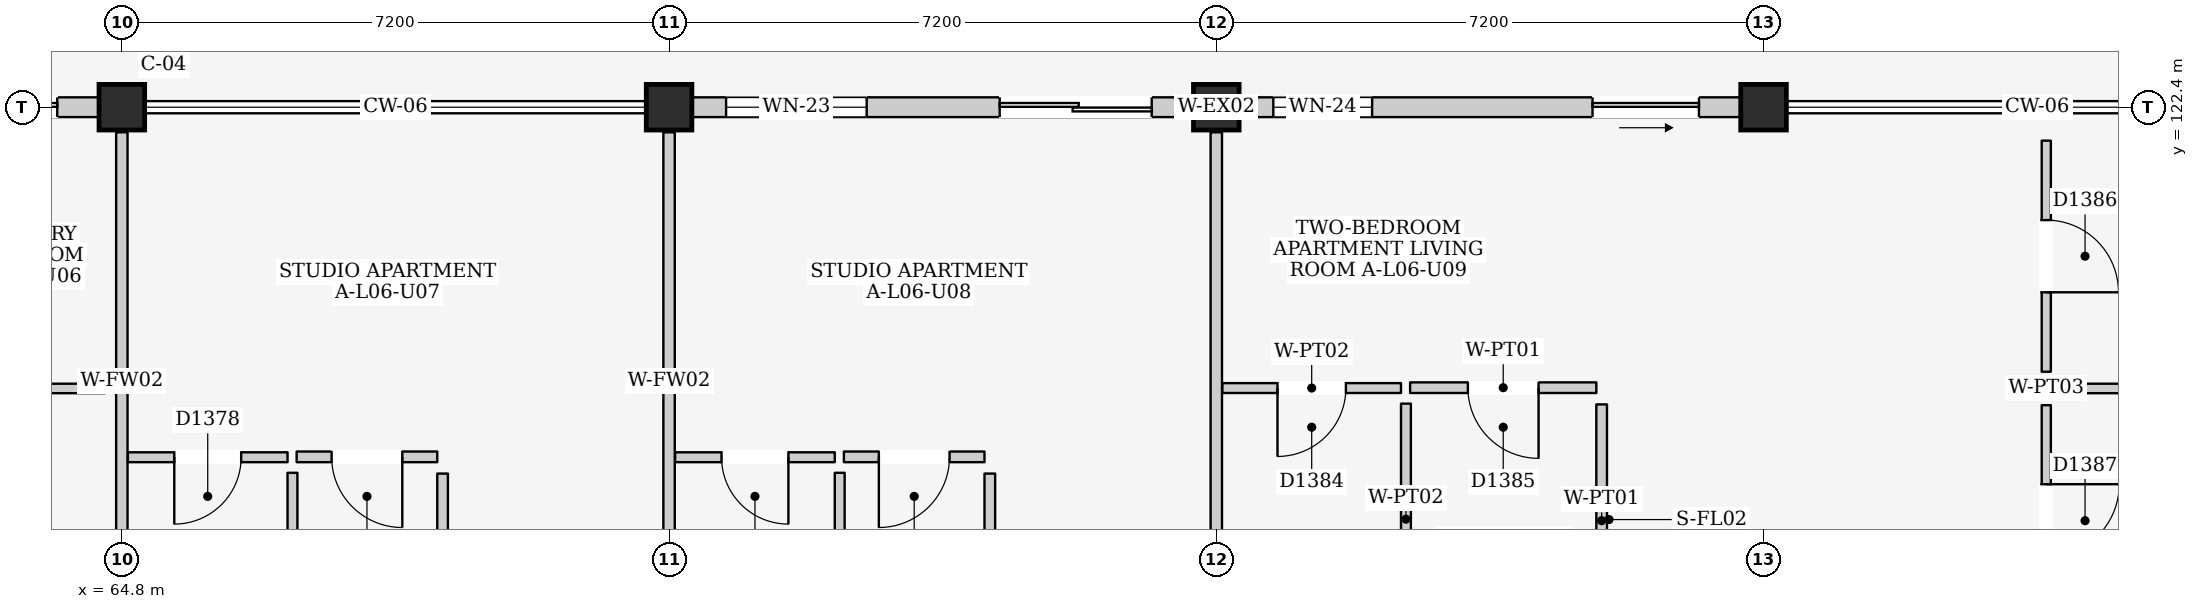
"""IFC4 building model, lengths in metres.
Left out: names, types, materials, properties, quantities, classifications, styles, units other than length and angle.
Written with IfcOpenShell. Run it as: python <this file> out.ifc"""

import sys

from ifc_helpers import new_model, si_unit, direction, frame, frame_2d, origin, origin_2d, place, context, subcontext, project, spatial, rectangle, extrude, element, fill, save


model = new_model("IFC4")
c1 = context("Model", 3, precision=1e-05, world=origin(), true_north=direction((0.0, 1.0)))
c2 = subcontext(c1, "Body", "Model", "MODEL_VIEW")
j1 = project(units=[si_unit("LENGTHUNIT", "METRE"), si_unit("PLANEANGLEUNIT", "RADIAN")], contexts=[c1])
p1 = place(None, origin())
s1 = spatial("IfcSite", under=j1, at=p1, CompositionType="ELEMENT")
p2 = place(p1, origin())
s2 = spatial("IfcBuilding", under=s1, at=p2, CompositionType="ELEMENT")
p3 = place(p2, frame((0.0, 0.0, 21.9)))
s3 = spatial("IfcBuildingStorey", under=s2, at=p3, CompositionType="ELEMENT", Elevation=21.9)
for number, where, z_axis, x_axis in (
    (1, (64.8, 122.4, 0.0), (0.0, 0.0, 1.0), (1.0, 0.0, 0.0)),
    (2, (72.0, 122.4, 0.0), (0.0, 0.0, 1.0), (1.0, 0.0, 0.0)),
    (3, (79.2, 122.4, 0.0), (0.0, 0.0, 1.0), (1.0, 0.0, 0.0)),
    (4, (86.4, 122.4, 0.0), (0.0, 0.0, 1.0), (1.0, 0.0, 0.0)),
):
    element("IfcColumn", number, at=place(p3, frame(where, z_axis=z_axis, x_axis=x_axis)), inside=s3, PredefinedType="COLUMN", context=c2, shape_type="SweptSolid", body=[
        extrude(rectangle(XDim=0.6, YDim=0.6, at=origin_2d()), origin(), (0.0, 0.0, 1.0), 3.2),
    ])
p4 = place(p3, frame((57.9, 122.4, 0.0), z_axis=(0.0, 0.0, 1.0), x_axis=(1.0, 0.0, 0.0)))
e5 = element("IfcWall", 5, at=p4, inside=s3, PredefinedType="ELEMENTEDWALL", context=c2, shape_type="SweptSolid", body=[
    extrude(rectangle(XDim=6.6, YDim=0.26, at=frame_2d((3.3, 0.0))), origin(), (0.0, 0.0, 1.0), 2.515),
])
p5 = place(p4, frame((4.55, 0.0, 0.0)))
e6 = element("IfcOpeningElement", 6, at=p5, cuts=e5, PredefinedType="OPENING", context=c2, shape_type="SweptSolid", body=[
    extrude(rectangle(XDim=1.5, YDim=2.12, at=frame_2d((0.75, 1.06))), frame((0.0, 0.145, 0.0), z_axis=(0.0, -1.0, 0.0), x_axis=(1.0, 0.0, 0.0)), (0.0, 0.0, 1.0), 0.29),
])
p6 = place(p4, frame((0.45, 0.0, 0.805)))
e7 = element("IfcOpeningElement", 7, at=p6, cuts=e5, PredefinedType="OPENING", context=c2, shape_type="SweptSolid", body=[
    extrude(rectangle(XDim=2.3, YDim=1.6, at=frame_2d((1.15, 0.8))), frame((0.0, 0.145, 0.0), z_axis=(0.0, -1.0, 0.0), x_axis=(1.0, 0.0, 0.0)), (0.0, 0.0, 1.0), 0.29),
])
p7 = place(p3, frame((72.3, 122.4, 0.0), z_axis=(0.0, 0.0, 1.0), x_axis=(1.0, 0.0, 0.0)))
e8 = element("IfcWall", 8, at=p7, inside=s3, PredefinedType="ELEMENTEDWALL", context=c2, shape_type="SweptSolid", body=[
    extrude(rectangle(XDim=6.6, YDim=0.26, at=frame_2d((3.3, 0.0))), origin(), (0.0, 0.0, 1.0), 2.515),
])
p8 = place(p7, frame((4.05, 0.0, 0.0)))
e9 = element("IfcOpeningElement", 9, at=p8, cuts=e8, PredefinedType="OPENING", context=c2, shape_type="SweptSolid", body=[
    extrude(rectangle(XDim=2.0, YDim=2.12, at=frame_2d((1.0, 1.06))), frame((0.0, 0.145, 0.0), z_axis=(0.0, -1.0, 0.0), x_axis=(1.0, 0.0, 0.0)), (0.0, 0.0, 1.0), 0.29),
])
p9 = place(p7, frame((0.45, 0.0, 0.9)))
e10 = element("IfcOpeningElement", 10, at=p9, cuts=e8, PredefinedType="OPENING", context=c2, shape_type="SweptSolid", body=[
    extrude(rectangle(XDim=1.85, YDim=1.4, at=frame_2d((0.925, 0.7))), frame((0.0, 0.145, 0.0), z_axis=(0.0, -1.0, 0.0), x_axis=(1.0, 0.0, 0.0)), (0.0, 0.0, 1.0), 0.29),
])
p10 = place(p3, frame((79.5, 122.4, 0.0), z_axis=(0.0, 0.0, 1.0), x_axis=(1.0, 0.0, 0.0)))
e11 = element("IfcWall", 11, at=p10, inside=s3, PredefinedType="ELEMENTEDWALL", context=c2, shape_type="SweptSolid", body=[
    extrude(rectangle(XDim=6.6, YDim=0.26, at=frame_2d((3.3, 0.0))), origin(), (0.0, 0.0, 1.0), 2.515),
])
p11 = place(p10, frame((4.65, 0.0, 0.0)))
e12 = element("IfcOpeningElement", 12, at=p11, cuts=e11, PredefinedType="OPENING", context=c2, shape_type="SweptSolid", body=[
    extrude(rectangle(XDim=1.4, YDim=2.1, at=frame_2d((0.7, 1.05))), frame((0.0, 0.145, 0.0), z_axis=(0.0, -1.0, 0.0), x_axis=(1.0, 0.0, 0.0)), (0.0, 0.0, 1.0), 0.29),
])
p12 = place(p10, frame((0.45, 0.0, 0.9)))
e13 = element("IfcOpeningElement", 13, at=p12, cuts=e11, PredefinedType="OPENING", context=c2, shape_type="SweptSolid", body=[
    extrude(rectangle(XDim=1.3, YDim=1.25, at=frame_2d((0.65, 0.625))), frame((0.0, 0.145, 0.0), z_axis=(0.0, -1.0, 0.0), x_axis=(1.0, 0.0, 0.0)), (0.0, 0.0, 1.0), 0.29),
])
p13 = place(p3, frame((64.8, 115.53, 0.0), z_axis=(0.0, 0.0, 1.0), x_axis=(0.0, 1.0, 0.0)))
e14 = element("IfcWall", 14, at=p13, inside=s3, PredefinedType="PARTITIONING", context=c2, shape_type="SweptSolid", body=[
    extrude(rectangle(XDim=6.54, YDim=0.15, at=frame_2d((3.27, 0.0))), origin(), (0.0, 0.0, 1.0), 2.465),
])
p14 = place(p3, frame((61.52, 118.7, 0.0), z_axis=(0.0, 0.0, 1.0), x_axis=(1.0, 0.0, 0.0)))
e15 = element("IfcWall", 15, at=p14, inside=s3, PredefinedType="PARTITIONING", context=c2, shape_type="SweptSolid", body=[
    extrude(rectangle(XDim=3.06, YDim=0.125, at=frame_2d((1.53, 0.0))), origin(), (0.0, 0.0, 1.0), 2.98),
])
p15 = place(p3, frame((72.0, 115.53, 0.0), z_axis=(0.0, 0.0, 1.0), x_axis=(0.0, 1.0, 0.0)))
e16 = element("IfcWall", 16, at=p15, inside=s3, PredefinedType="PARTITIONING", context=c2, shape_type="SweptSolid", body=[
    extrude(rectangle(XDim=6.54, YDim=0.15, at=frame_2d((3.27, 0.0))), origin(), (0.0, 0.0, 1.0), 2.465),
])
p16 = place(p3, frame((64.88, 117.795, 0.0), z_axis=(0.0, 0.0, 1.0), x_axis=(1.0, 0.0, 0.0)))
e17 = element("IfcWall", 17, at=p16, inside=s3, PredefinedType="PARTITIONING", context=c2, shape_type="SweptSolid", body=[
    extrude(rectangle(XDim=2.1, YDim=0.13, at=frame_2d((1.05, 0.0))), origin(), (0.0, 0.0, 1.0), 2.98),
])
p17 = place(p16, frame((0.61, 0.0, 0.0)))
e18 = element("IfcOpeningElement", 18, at=p17, cuts=e17, PredefinedType="OPENING", context=c2, shape_type="SweptSolid", body=[
    extrude(rectangle(XDim=0.88, YDim=2.1, at=frame_2d((0.44, 1.05))), frame((0.0, 0.08, 0.0), z_axis=(0.0, -1.0, 0.0), x_axis=(1.0, 0.0, 0.0)), (0.0, 0.0, 1.0), 0.16),
])
p18 = place(p3, frame((67.045, 115.46, 0.0), z_axis=(0.0, 0.0, 1.0), x_axis=(0.0, 1.0, 0.0)))
e19 = element("IfcWall", 19, at=p18, inside=s3, PredefinedType="PARTITIONING", context=c2, shape_type="SweptSolid", body=[
    extrude(rectangle(XDim=2.13, YDim=0.13, at=frame_2d((1.065, 0.0))), origin(), (0.0, 0.0, 1.0), 2.98),
])
p19 = place(p3, frame((67.1, 117.8, 0.0), z_axis=(0.0, 0.0, 1.0), x_axis=(1.0, 0.0, 0.0)))
e20 = element("IfcWall", 20, at=p19, inside=s3, PredefinedType="PARTITIONING", context=c2, shape_type="SweptSolid", body=[
    extrude(rectangle(XDim=1.85, YDim=0.14, at=frame_2d((0.925, 0.0))), origin(), (0.0, 0.0, 1.0), 2.98),
])
p20 = place(p19, frame((0.46, 0.0, 0.0)))
e21 = element("IfcOpeningElement", 21, at=p20, cuts=e20, PredefinedType="OPENING", context=c2, shape_type="SweptSolid", body=[
    extrude(rectangle(XDim=0.93, YDim=2.14, at=frame_2d((0.465, 1.07))), frame((0.0, 0.085, 0.0), z_axis=(0.0, -1.0, 0.0), x_axis=(1.0, 0.0, 0.0)), (0.0, 0.0, 1.0), 0.17),
])
p21 = place(p3, frame((69.02, 115.43, 0.0), z_axis=(0.0, 0.0, 1.0), x_axis=(0.0, 1.0, 0.0)))
e22 = element("IfcWall", 22, at=p21, inside=s3, PredefinedType="PARTITIONING", context=c2, shape_type="SweptSolid", body=[
    extrude(rectangle(XDim=2.15, YDim=0.14, at=frame_2d((1.075, 0.0))), origin(), (0.0, 0.0, 1.0), 2.98),
])
p22 = place(p3, frame((79.2, 115.53, 0.0), z_axis=(0.0, 0.0, 1.0), x_axis=(0.0, 1.0, 0.0)))
e23 = element("IfcWall", 23, at=p22, inside=s3, PredefinedType="PARTITIONING", context=c2, shape_type="SweptSolid", body=[
    extrude(rectangle(XDim=6.54, YDim=0.15, at=frame_2d((3.27, 0.0))), origin(), (0.0, 0.0, 1.0), 2.465),
])
p23 = place(p3, frame((72.08, 117.795, 0.0), z_axis=(0.0, 0.0, 1.0), x_axis=(1.0, 0.0, 0.0)))
e24 = element("IfcWall", 24, at=p23, inside=s3, PredefinedType="PARTITIONING", context=c2, shape_type="SweptSolid", body=[
    extrude(rectangle(XDim=2.1, YDim=0.13, at=frame_2d((1.05, 0.0))), origin(), (0.0, 0.0, 1.0), 2.98),
])
p24 = place(p23, frame((0.61, 0.0, 0.0)))
e25 = element("IfcOpeningElement", 25, at=p24, cuts=e24, PredefinedType="OPENING", context=c2, shape_type="SweptSolid", body=[
    extrude(rectangle(XDim=0.88, YDim=2.1, at=frame_2d((0.44, 1.05))), frame((0.0, 0.08, 0.0), z_axis=(0.0, -1.0, 0.0), x_axis=(1.0, 0.0, 0.0)), (0.0, 0.0, 1.0), 0.16),
])
p25 = place(p3, frame((74.245, 115.46, 0.0), z_axis=(0.0, 0.0, 1.0), x_axis=(0.0, 1.0, 0.0)))
e26 = element("IfcWall", 26, at=p25, inside=s3, PredefinedType="PARTITIONING", context=c2, shape_type="SweptSolid", body=[
    extrude(rectangle(XDim=2.13, YDim=0.13, at=frame_2d((1.065, 0.0))), origin(), (0.0, 0.0, 1.0), 2.98),
])
p26 = place(p3, frame((74.3, 117.8, 0.0), z_axis=(0.0, 0.0, 1.0), x_axis=(1.0, 0.0, 0.0)))
e27 = element("IfcWall", 27, at=p26, inside=s3, PredefinedType="PARTITIONING", context=c2, shape_type="SweptSolid", body=[
    extrude(rectangle(XDim=1.85, YDim=0.14, at=frame_2d((0.925, 0.0))), origin(), (0.0, 0.0, 1.0), 2.98),
])
p27 = place(p26, frame((0.46, 0.0, 0.0)))
e28 = element("IfcOpeningElement", 28, at=p27, cuts=e27, PredefinedType="OPENING", context=c2, shape_type="SweptSolid", body=[
    extrude(rectangle(XDim=0.93, YDim=2.14, at=frame_2d((0.465, 1.07))), frame((0.0, 0.085, 0.0), z_axis=(0.0, -1.0, 0.0), x_axis=(1.0, 0.0, 0.0)), (0.0, 0.0, 1.0), 0.17),
])
p28 = place(p3, frame((76.22, 115.43, 0.0), z_axis=(0.0, 0.0, 1.0), x_axis=(0.0, 1.0, 0.0)))
e29 = element("IfcWall", 29, at=p28, inside=s3, PredefinedType="PARTITIONING", context=c2, shape_type="SweptSolid", body=[
    extrude(rectangle(XDim=2.15, YDim=0.14, at=frame_2d((1.075, 0.0))), origin(), (0.0, 0.0, 1.0), 2.98),
])
p29 = place(p3, frame((79.28, 118.705, 0.0), z_axis=(0.0, 0.0, 1.0), x_axis=(1.0, 0.0, 0.0)))
e30 = element("IfcWall", 30, at=p29, inside=s3, PredefinedType="PARTITIONING", context=c2, shape_type="SweptSolid", body=[
    extrude(rectangle(XDim=2.35, YDim=0.13, at=frame_2d((1.175, 0.0))), origin(), (0.0, 0.0, 1.0), 2.98),
])
p30 = place(p29, frame((0.725, 0.0, 0.0)))
e31 = element("IfcOpeningElement", 31, at=p30, cuts=e30, PredefinedType="OPENING", context=c2, shape_type="SweptSolid", body=[
    extrude(rectangle(XDim=0.9, YDim=2.1, at=frame_2d((0.45, 1.05))), frame((0.0, 0.08, 0.0), z_axis=(0.0, -1.0, 0.0), x_axis=(1.0, 0.0, 0.0)), (0.0, 0.0, 1.0), 0.16),
])
p31 = place(p3, frame((81.695, 115.46, 0.0), z_axis=(0.0, 0.0, 1.0), x_axis=(0.0, 1.0, 0.0)))
e32 = element("IfcWall", 32, at=p31, inside=s3, PredefinedType="PARTITIONING", context=c2, shape_type="SweptSolid", body=[
    extrude(rectangle(XDim=3.04, YDim=0.13, at=frame_2d((1.52, 0.0))), origin(), (0.0, 0.0, 1.0), 2.98),
])
p32 = place(p3, frame((81.75, 118.71, 0.0), z_axis=(0.0, 0.0, 1.0), x_axis=(1.0, 0.0, 0.0)))
e33 = element("IfcWall", 33, at=p32, inside=s3, PredefinedType="PARTITIONING", context=c2, shape_type="SweptSolid", body=[
    extrude(rectangle(XDim=2.45, YDim=0.14, at=frame_2d((1.225, 0.0))), origin(), (0.0, 0.0, 1.0), 2.98),
])
p33 = place(p32, frame((0.76, 0.0, 0.0)))
e34 = element("IfcOpeningElement", 34, at=p33, cuts=e33, PredefinedType="OPENING", context=c2, shape_type="SweptSolid", body=[
    extrude(rectangle(XDim=0.93, YDim=2.14, at=frame_2d((0.465, 1.07))), frame((0.0, 0.085, 0.0), z_axis=(0.0, -1.0, 0.0), x_axis=(1.0, 0.0, 0.0)), (0.0, 0.0, 1.0), 0.17),
])
p34 = place(p3, frame((84.27, 115.43, 0.0), z_axis=(0.0, 0.0, 1.0), x_axis=(0.0, 1.0, 0.0)))
e35 = element("IfcWall", 35, at=p34, inside=s3, PredefinedType="PARTITIONING", context=c2, shape_type="SweptSolid", body=[
    extrude(rectangle(XDim=3.06, YDim=0.14, at=frame_2d((1.53, 0.0))), origin(), (0.0, 0.0, 1.0), 2.98),
])
p35 = place(p3, frame((90.12, 118.92, 0.0), z_axis=(0.0, 0.0, 1.0), x_axis=(0.0, 1.0, 0.0)))
e36 = element("IfcWall", 36, at=p35, inside=s3, PredefinedType="PARTITIONING", context=c2, shape_type="SweptSolid", body=[
    extrude(rectangle(XDim=3.04, YDim=0.12, at=frame_2d((1.52, 0.0))), origin(), (0.0, 0.0, 1.0), 2.98),
])
p36 = place(p35, frame((1.045, 0.0, 0.0)))
e37 = element("IfcOpeningElement", 37, at=p36, cuts=e36, PredefinedType="OPENING", context=c2, shape_type="SweptSolid", body=[
    extrude(rectangle(XDim=0.95, YDim=2.15, at=frame_2d((0.475, 1.075))), frame((0.0, 0.075, 0.0), z_axis=(0.0, -1.0, 0.0), x_axis=(1.0, 0.0, 0.0)), (0.0, 0.0, 1.0), 0.15),
])
p37 = place(p3, frame((90.32, 118.7, 0.0), z_axis=(0.0, 0.0, 1.0), x_axis=(1.0, 0.0, 0.0)))
e38 = element("IfcWall", 38, at=p37, inside=s3, PredefinedType="PARTITIONING", context=c2, shape_type="SweptSolid", body=[
    extrude(rectangle(XDim=3.06, YDim=0.125, at=frame_2d((1.53, 0.0))), origin(), (0.0, 0.0, 1.0), 2.98),
])
p38 = place(p3, frame((90.12, 115.44, 0.0), z_axis=(0.0, 0.0, 1.0), x_axis=(0.0, 1.0, 0.0)))
e39 = element("IfcWall", 39, at=p38, inside=s3, PredefinedType="PARTITIONING", context=c2, shape_type="SweptSolid", body=[
    extrude(rectangle(XDim=3.04, YDim=0.12, at=frame_2d((1.52, 0.0))), origin(), (0.0, 0.0, 1.0), 2.98),
])
p39 = place(p38, frame((1.04, 0.0, 0.0)))
e40 = element("IfcOpeningElement", 40, at=p39, cuts=e39, PredefinedType="OPENING", context=c2, shape_type="SweptSolid", body=[
    extrude(rectangle(XDim=0.96, YDim=2.15, at=frame_2d((0.48, 1.075))), frame((0.0, 0.075, 0.0), z_axis=(0.0, -1.0, 0.0), x_axis=(1.0, 0.0, 0.0)), (0.0, 0.0, 1.0), 0.15),
])
p40 = place(p5, frame((1.5, 0.0, 0.0), z_axis=(0.0, 0.0, 1.0), x_axis=(-1.0, 0.0, 0.0)))
e41 = element("IfcDoor", 41, at=p40, inside=s3, OperationType="SLIDING_TO_LEFT", PredefinedType="DOOR", context=c2, shape_type="SweptSolid", body=[
    extrude(rectangle(XDim=1.5, YDim=2.12, at=frame_2d((0.75, 1.06))), frame((0.0, 0.025, 0.0), z_axis=(0.0, -1.0, 0.0), x_axis=(1.0, 0.0, 0.0)), (0.0, 0.0, 1.0), 0.05),
])
fill(e6, e41)
p41 = place(p8, frame((2.0, 0.0, 0.0), z_axis=(0.0, 0.0, 1.0), x_axis=(-1.0, 0.0, 0.0)))
e42 = element("IfcDoor", 42, at=p41, inside=s3, OperationType="DOUBLE_DOOR_SLIDING", PredefinedType="DOOR", context=c2, shape_type="SweptSolid", body=[
    extrude(rectangle(XDim=2.0, YDim=2.12, at=frame_2d((1.0, 1.06))), frame((0.0, 0.025, 0.0), z_axis=(0.0, -1.0, 0.0), x_axis=(1.0, 0.0, 0.0)), (0.0, 0.0, 1.0), 0.05),
])
fill(e9, e42)
p42 = place(p9, origin())
e43 = element("IfcWindow", 43, at=p42, inside=s3, PartitioningType="DOUBLE_PANEL_VERTICAL", PredefinedType="WINDOW", context=c2, shape_type="SweptSolid", body=[
    extrude(rectangle(XDim=1.85, YDim=1.4, at=frame_2d((0.925, 0.7))), frame((0.0, 0.03, 0.0), z_axis=(0.0, -1.0, 0.0), x_axis=(1.0, 0.0, 0.0)), (0.0, 0.0, 1.0), 0.06),
])
fill(e10, e43)
p43 = place(p11, frame((1.4, 0.0, 0.0), z_axis=(0.0, 0.0, 1.0), x_axis=(-1.0, 0.0, 0.0)))
e44 = element("IfcDoor", 44, at=p43, inside=s3, OperationType="SLIDING_TO_RIGHT", PredefinedType="DOOR", context=c2, shape_type="SweptSolid", body=[
    extrude(rectangle(XDim=1.4, YDim=2.1, at=frame_2d((0.7, 1.05))), frame((0.0, 0.025, 0.0), z_axis=(0.0, -1.0, 0.0), x_axis=(1.0, 0.0, 0.0)), (0.0, 0.0, 1.0), 0.05),
])
fill(e12, e44)
p44 = place(p12, origin())
e45 = element("IfcWindow", 45, at=p44, inside=s3, PartitioningType="SINGLE_PANEL", PredefinedType="WINDOW", context=c2, shape_type="SweptSolid", body=[
    extrude(rectangle(XDim=1.3, YDim=1.25, at=frame_2d((0.65, 0.625))), frame((0.0, 0.03, 0.0), z_axis=(0.0, -1.0, 0.0), x_axis=(1.0, 0.0, 0.0)), (0.0, 0.0, 1.0), 0.06),
])
fill(e13, e45)
p45 = place(p17, frame((0.88, 0.0, 0.0), z_axis=(0.0, 0.0, 1.0), x_axis=(-1.0, 0.0, 0.0)))
e46 = element("IfcDoor", 46, at=p45, inside=s3, OperationType="SINGLE_SWING_RIGHT", PredefinedType="DOOR", context=c2, shape_type="SweptSolid", body=[
    extrude(rectangle(XDim=0.88, YDim=2.1, at=frame_2d((0.44, 1.05))), frame((0.0, 0.025, 0.0), z_axis=(0.0, -1.0, 0.0), x_axis=(1.0, 0.0, 0.0)), (0.0, 0.0, 1.0), 0.05),
])
fill(e18, e46)
p46 = place(p20, frame((0.93, 0.0, 0.0), z_axis=(0.0, 0.0, 1.0), x_axis=(-1.0, 0.0, 0.0)))
e47 = element("IfcDoor", 47, at=p46, inside=s3, OperationType="SINGLE_SWING_LEFT", PredefinedType="DOOR", context=c2, shape_type="SweptSolid", body=[
    extrude(rectangle(XDim=0.93, YDim=2.14, at=frame_2d((0.465, 1.07))), frame((0.0, 0.025, 0.0), z_axis=(0.0, -1.0, 0.0), x_axis=(1.0, 0.0, 0.0)), (0.0, 0.0, 1.0), 0.05),
])
fill(e21, e47)
p47 = place(p24, frame((0.88, 0.0, 0.0), z_axis=(0.0, 0.0, 1.0), x_axis=(-1.0, 0.0, 0.0)))
e48 = element("IfcDoor", 48, at=p47, inside=s3, OperationType="SINGLE_SWING_LEFT", PredefinedType="DOOR", context=c2, shape_type="SweptSolid", body=[
    extrude(rectangle(XDim=0.88, YDim=2.1, at=frame_2d((0.44, 1.05))), frame((0.0, 0.025, 0.0), z_axis=(0.0, -1.0, 0.0), x_axis=(1.0, 0.0, 0.0)), (0.0, 0.0, 1.0), 0.05),
])
fill(e25, e48)
p48 = place(p27, frame((0.93, 0.0, 0.0), z_axis=(0.0, 0.0, 1.0), x_axis=(-1.0, 0.0, 0.0)))
e49 = element("IfcDoor", 49, at=p48, inside=s3, OperationType="SINGLE_SWING_RIGHT", PredefinedType="DOOR", context=c2, shape_type="SweptSolid", body=[
    extrude(rectangle(XDim=0.93, YDim=2.14, at=frame_2d((0.465, 1.07))), frame((0.0, 0.025, 0.0), z_axis=(0.0, -1.0, 0.0), x_axis=(1.0, 0.0, 0.0)), (0.0, 0.0, 1.0), 0.05),
])
fill(e28, e49)
p49 = place(p30, frame((0.9, 0.0, 0.0), z_axis=(0.0, 0.0, 1.0), x_axis=(-1.0, 0.0, 0.0)))
e50 = element("IfcDoor", 50, at=p49, inside=s3, OperationType="SINGLE_SWING_RIGHT", PredefinedType="DOOR", context=c2, shape_type="SweptSolid", body=[
    extrude(rectangle(XDim=0.9, YDim=2.1, at=frame_2d((0.45, 1.05))), frame((0.0, 0.025, 0.0), z_axis=(0.0, -1.0, 0.0), x_axis=(1.0, 0.0, 0.0)), (0.0, 0.0, 1.0), 0.05),
])
fill(e31, e50)
p50 = place(p33, frame((0.93, 0.0, 0.0), z_axis=(0.0, 0.0, 1.0), x_axis=(-1.0, 0.0, 0.0)))
e51 = element("IfcDoor", 51, at=p50, inside=s3, OperationType="SINGLE_SWING_LEFT", PredefinedType="DOOR", context=c2, shape_type="SweptSolid", body=[
    extrude(rectangle(XDim=0.93, YDim=2.14, at=frame_2d((0.465, 1.07))), frame((0.0, 0.025, 0.0), z_axis=(0.0, -1.0, 0.0), x_axis=(1.0, 0.0, 0.0)), (0.0, 0.0, 1.0), 0.05),
])
fill(e34, e51)
p51 = place(p36, frame((0.95, 0.0, 0.0), z_axis=(0.0, 0.0, 1.0), x_axis=(-1.0, 0.0, 0.0)))
e52 = element("IfcDoor", 52, at=p51, inside=s3, OperationType="SINGLE_SWING_RIGHT", PredefinedType="DOOR", context=c2, shape_type="SweptSolid", body=[
    extrude(rectangle(XDim=0.95, YDim=2.15, at=frame_2d((0.475, 1.075))), frame((0.0, 0.025, 0.0), z_axis=(0.0, -1.0, 0.0), x_axis=(1.0, 0.0, 0.0)), (0.0, 0.0, 1.0), 0.05),
])
fill(e37, e52)
p52 = place(p39, frame((0.96, 0.0, 0.0), z_axis=(0.0, 0.0, 1.0), x_axis=(-1.0, 0.0, 0.0)))
e53 = element("IfcDoor", 53, at=p52, inside=s3, OperationType="SINGLE_SWING_LEFT", PredefinedType="DOOR", context=c2, shape_type="SweptSolid", body=[
    extrude(rectangle(XDim=0.96, YDim=2.15, at=frame_2d((0.48, 1.075))), frame((0.0, 0.025, 0.0), z_axis=(0.0, -1.0, 0.0), x_axis=(1.0, 0.0, 0.0)), (0.0, 0.0, 1.0), 0.05),
])
fill(e40, e53)
save(model, sys.argv[1])
